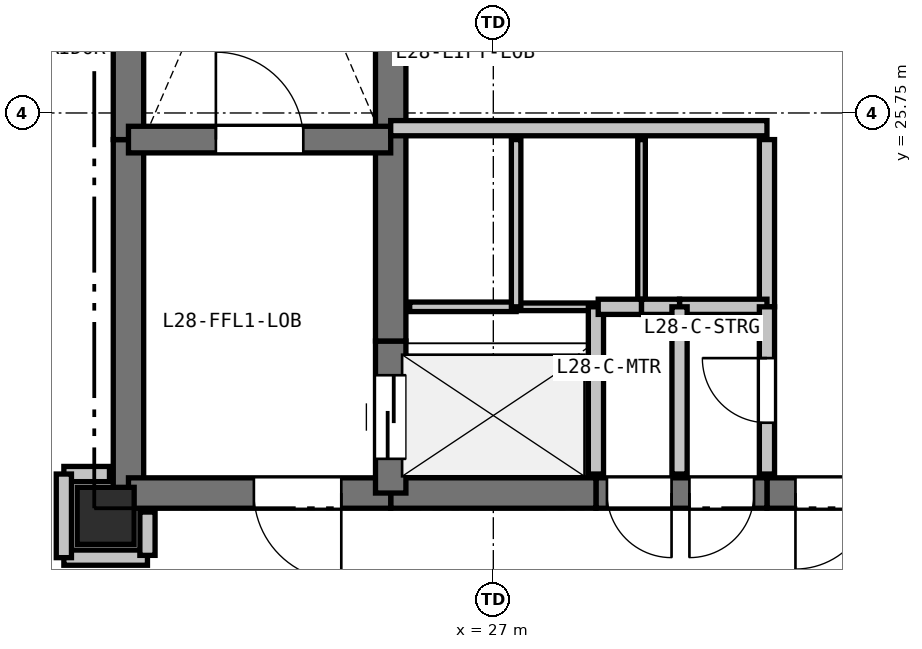
"""IFC4 building model, lengths in metres.
Left out: names, types, materials, properties, quantities, classifications, styles, units other than length and angle.
Written with IfcOpenShell. Run it as: python <this file> out.ifc"""

import sys

from ifc_helpers import new_model, si_unit, direction, frame, frame_2d, origin, origin_2d, place, context, subcontext, project, spatial, rectangle, extrude, element, fill, save


model = new_model("IFC4")
c1 = context("Model", 3, precision=1e-05, world=origin(), true_north=direction((0.0, 1.0)))
c2 = subcontext(c1, "Body", "Model", "MODEL_VIEW")
j1 = project(units=[si_unit("LENGTHUNIT", "METRE"), si_unit("PLANEANGLEUNIT", "RADIAN")], contexts=[c1])
p1 = place(None, origin())
s1 = spatial("IfcSite", under=j1, at=p1, CompositionType="ELEMENT")
p2 = place(p1, origin())
s2 = spatial("IfcBuilding", under=s1, at=p2, CompositionType="ELEMENT")
p3 = place(p2, frame((0.0, 0.0, 103.2)))
s3 = spatial("IfcBuildingStorey", under=s2, at=p3, CompositionType="ELEMENT", Elevation=103.2)
p4 = place(p3, frame((21.9, 20.45, 0.0), z_axis=(0.0, 0.0, 1.0), x_axis=(1.0, 0.0, 0.0)))
e1 = element("IfcColumn", 1, at=p4, inside=s3, PredefinedType="COLUMN", context=c2, shape_type="SweptSolid", body=[
    extrude(rectangle(XDim=0.75, YDim=0.75, at=origin_2d()), origin(), (0.0, 0.0, 1.0), 3.3),
])
p5 = place(p3, frame((22.2, 20.75, 0.0), z_axis=(0.0, 0.0, 1.0), x_axis=(0.0, 1.0, 0.0)))
e2 = element("IfcWall", 2, at=p5, inside=s3, PredefinedType="SHEAR", context=c2, shape_type="SweptSolid", body=[
    extrude(rectangle(XDim=4.65, YDim=0.4, at=frame_2d((2.325, 0.0))), origin(), (0.0, 0.0, 1.0), 3.05),
])
p6 = place(p3, frame((22.2, 25.4, 0.0), z_axis=(0.0, 0.0, 1.0), x_axis=(0.0, 1.0, 0.0)))
e3 = element("IfcWall", 3, at=p6, inside=s3, PredefinedType="SHEAR", context=c2, shape_type="SweptSolid", body=[
    extrude(rectangle(XDim=7.35, YDim=0.4, at=frame_2d((3.675, 0.0))), origin(), (0.0, 0.0, 1.0), 3.05),
])
p7 = place(p3, frame((32.35, 20.75, 0.0), z_axis=(0.0, 0.0, 1.0), x_axis=(-1.0, 0.0, 0.0)))
e4 = element("IfcWall", 4, at=p7, inside=s3, PredefinedType="SHEAR", context=c2, shape_type="SweptSolid", body=[
    extrude(rectangle(XDim=1.75, YDim=0.4, at=frame_2d((0.875, 0.0))), origin(), (0.0, 0.0, 1.0), 3.05),
])
p8 = place(p7, frame((0.375, 0.0, 0.0)))
e5 = element("IfcOpeningElement", 5, at=p8, cuts=e4, PredefinedType="OPENING", context=c2, shape_type="SweptSolid", body=[
    extrude(rectangle(XDim=1.0, YDim=2.15, at=frame_2d((0.5, 1.075))), frame((0.0, 0.21, 0.0), z_axis=(0.0, -1.0, 0.0), x_axis=(1.0, 0.0, 0.0)), (0.0, 0.0, 1.0), 0.42),
])
p9 = place(p3, frame((30.6, 20.75, 0.0), z_axis=(0.0, 0.0, 1.0), x_axis=(-1.0, 0.0, 0.0)))
e6 = element("IfcWall", 6, at=p9, inside=s3, PredefinedType="SHEAR", context=c2, shape_type="SweptSolid", body=[
    extrude(rectangle(XDim=2.25, YDim=0.4, at=frame_2d((1.125, 0.0))), origin(), (0.0, 0.0, 1.0), 3.05),
])
p10 = place(p9, frame((1.255, 0.0, 0.0)))
e7 = element("IfcOpeningElement", 7, at=p10, cuts=e6, PredefinedType="OPENING", context=c2, shape_type="SweptSolid", body=[
    extrude(rectangle(XDim=0.85, YDim=2.1, at=frame_2d((0.425, 1.05))), frame((0.0, 0.21, 0.0), z_axis=(0.0, -1.0, 0.0), x_axis=(1.0, 0.0, 0.0)), (0.0, 0.0, 1.0), 0.42),
])
p11 = place(p9, frame((0.17, 0.0, 0.0)))
e8 = element("IfcOpeningElement", 8, at=p11, cuts=e6, PredefinedType="OPENING", context=c2, shape_type="SweptSolid", body=[
    extrude(rectangle(XDim=0.85, YDim=2.1, at=frame_2d((0.425, 1.05))), frame((0.0, 0.21, 0.0), z_axis=(0.0, -1.0, 0.0), x_axis=(1.0, 0.0, 0.0)), (0.0, 0.0, 1.0), 0.42),
])
p12 = place(p3, frame((28.35, 20.75, 0.0), z_axis=(0.0, 0.0, 1.0), x_axis=(-1.0, 0.0, 0.0)))
e9 = element("IfcWall", 9, at=p12, inside=s3, PredefinedType="SHEAR", context=c2, shape_type="SweptSolid", body=[
    extrude(rectangle(XDim=2.7, YDim=0.4, at=frame_2d((1.35, 0.0))), origin(), (0.0, 0.0, 1.0), 3.05),
])
p13 = place(p3, frame((25.65, 20.75, 0.0), z_axis=(0.0, 0.0, 1.0), x_axis=(-1.0, 0.0, 0.0)))
e10 = element("IfcWall", 10, at=p13, inside=s3, PredefinedType="SHEAR", context=c2, shape_type="SweptSolid", body=[
    extrude(rectangle(XDim=3.45, YDim=0.4, at=frame_2d((1.725, 0.0))), origin(), (0.0, 0.0, 1.0), 3.05),
])
p14 = place(p13, frame((0.65, 0.0, 0.0)))
e11 = element("IfcOpeningElement", 11, at=p14, cuts=e10, PredefinedType="OPENING", context=c2, shape_type="SweptSolid", body=[
    extrude(rectangle(XDim=1.15, YDim=2.15, at=frame_2d((0.575, 1.075))), frame((0.0, 0.21, 0.0), z_axis=(0.0, -1.0, 0.0), x_axis=(1.0, 0.0, 0.0)), (0.0, 0.0, 1.0), 0.42),
])
p15 = place(p3, frame((25.65, 20.75, 0.0), z_axis=(0.0, 0.0, 1.0), x_axis=(0.0, 1.0, 0.0)))
e12 = element("IfcWall", 12, at=p15, inside=s3, PredefinedType="SHEAR", context=c2, shape_type="SweptSolid", body=[
    extrude(rectangle(XDim=2.0, YDim=0.4, at=frame_2d((1.0, 0.0))), origin(), (0.0, 0.0, 1.0), 3.05),
])
p16 = place(p15, frame((0.45, 0.0, 0.0)))
e13 = element("IfcOpeningElement", 13, at=p16, cuts=e12, PredefinedType="OPENING", context=c2, shape_type="SweptSolid", body=[
    extrude(rectangle(XDim=1.1, YDim=2.15, at=frame_2d((0.55, 1.075))), frame((0.0, 0.21, 0.0), z_axis=(0.0, -1.0, 0.0), x_axis=(1.0, 0.0, 0.0)), (0.0, 0.0, 1.0), 0.42),
])
p17 = place(p3, frame((25.65, 22.75, 0.0), z_axis=(0.0, 0.0, 1.0), x_axis=(0.0, 1.0, 0.0)))
e14 = element("IfcWall", 14, at=p17, inside=s3, PredefinedType="SHEAR", context=c2, shape_type="SweptSolid", body=[
    extrude(rectangle(XDim=2.8, YDim=0.4, at=frame_2d((1.4, 0.0))), origin(), (0.0, 0.0, 1.0), 3.05),
])
p18 = place(p3, frame((25.65, 25.55, 0.0), z_axis=(0.0, 0.0, 1.0), x_axis=(0.0, 1.0, 0.0)))
e15 = element("IfcWall", 15, at=p18, inside=s3, PredefinedType="SHEAR", context=c2, shape_type="SweptSolid", body=[
    extrude(rectangle(XDim=2.4, YDim=0.4, at=frame_2d((1.2, 0.0))), origin(), (0.0, 0.0, 1.0), 3.05),
])
p19 = place(p3, frame((22.2, 25.4, 0.0), z_axis=(0.0, 0.0, 1.0), x_axis=(1.0, 0.0, 0.0)))
e16 = element("IfcWall", 16, at=p19, inside=s3, PredefinedType="SHEAR", context=c2, shape_type="SweptSolid", body=[
    extrude(rectangle(XDim=3.45, YDim=0.35, at=frame_2d((1.725, 0.0))), origin(), (0.0, 0.0, 1.0), 3.05),
])
p20 = place(p19, frame((1.15, 0.0, 0.0)))
e17 = element("IfcOpeningElement", 17, at=p20, cuts=e16, PredefinedType="OPENING", context=c2, shape_type="SweptSolid", body=[
    extrude(rectangle(XDim=1.15, YDim=2.15, at=frame_2d((0.575, 1.075))), frame((0.0, 0.185, 0.0), z_axis=(0.0, -1.0, 0.0), x_axis=(1.0, 0.0, 0.0)), (0.0, 0.0, 1.0), 0.37),
])
p21 = place(p3, frame((25.65, 25.55, 0.0), z_axis=(0.0, 0.0, 1.0), x_axis=(1.0, 0.0, 0.0)))
e18 = element("IfcWall", 18, at=p21, inside=s3, PredefinedType="PARTITIONING", context=c2, shape_type="SweptSolid", body=[
    extrude(rectangle(XDim=4.95, YDim=0.2, at=frame_2d((2.475, 0.0))), origin(), (0.0, 0.0, 1.0), 3.05),
])
p22 = place(p3, frame((25.9, 23.2, 0.0), z_axis=(0.0, 0.0, 1.0), x_axis=(1.0, 0.0, 0.0)))
e19 = element("IfcWall", 19, at=p22, inside=s3, PredefinedType="PARTITIONING", context=c2, shape_type="SweptSolid", body=[
    extrude(rectangle(XDim=1.4, YDim=0.125, at=frame_2d((0.7, 0.0))), origin(), (0.0, 0.0, 1.0), 3.05),
])
p23 = place(p3, frame((27.3, 23.2, 0.0), z_axis=(0.0, 0.0, 1.0), x_axis=(1.0, 0.0, 0.0)))
e20 = element("IfcWall", 20, at=p23, inside=s3, PredefinedType="PARTITIONING", context=c2, shape_type="SweptSolid", body=[
    extrude(rectangle(XDim=1.05, YDim=0.1, at=frame_2d((0.525, 0.0))), origin(), (0.0, 0.0, 1.0), 3.05),
])
p24 = place(p3, frame((28.35, 23.2, 0.0), z_axis=(0.0, 0.0, 1.0), x_axis=(0.0, -1.0, 0.0)))
e21 = element("IfcWall", 21, at=p24, inside=s3, PredefinedType="PARTITIONING", context=c2, shape_type="SweptSolid", body=[
    extrude(rectangle(XDim=2.2, YDim=0.2, at=frame_2d((1.1, 0.0))), origin(), (0.0, 0.0, 1.0), 3.05),
])
p25 = place(p3, frame((27.3, 25.4, 0.0), z_axis=(0.0, 0.0, 1.0), x_axis=(0.0, -1.0, 0.0)))
e22 = element("IfcWall", 22, at=p25, inside=s3, PredefinedType="PARTITIONING", context=c2, shape_type="SweptSolid", body=[
    extrude(rectangle(XDim=2.2, YDim=0.125, at=frame_2d((1.1, 0.0))), origin(), (0.0, 0.0, 1.0), 3.05),
])
p26 = place(p3, frame((28.95, 25.4, 0.0), z_axis=(0.0, 0.0, 1.0), x_axis=(0.0, -1.0, 0.0)))
e23 = element("IfcWall", 23, at=p26, inside=s3, PredefinedType="PARTITIONING", context=c2, shape_type="SweptSolid", body=[
    extrude(rectangle(XDim=2.2, YDim=0.1, at=frame_2d((1.1, 0.0))), origin(), (0.0, 0.0, 1.0), 3.05),
])
p27 = place(p3, frame((28.95, 23.2, 0.0), z_axis=(0.0, 0.0, 1.0), x_axis=(-1.0, 0.0, 0.0)))
e24 = element("IfcWall", 24, at=p27, inside=s3, PredefinedType="PARTITIONING", context=c2, shape_type="SweptSolid", body=[
    extrude(rectangle(XDim=0.57, YDim=0.2, at=frame_2d((0.285, 0.0))), origin(), (0.0, 0.0, 1.0), 3.05),
])
p28 = place(p3, frame((30.6, 25.4, 0.0), z_axis=(0.0, 0.0, 1.0), x_axis=(0.0, -1.0, 0.0)))
e25 = element("IfcWall", 25, at=p28, inside=s3, PredefinedType="PARTITIONING", context=c2, shape_type="SweptSolid", body=[
    extrude(rectangle(XDim=2.2, YDim=0.2, at=frame_2d((1.1, 0.0))), origin(), (0.0, 0.0, 1.0), 3.05),
])
p29 = place(p3, frame((30.6, 23.2, 0.0), z_axis=(0.0, 0.0, 1.0), x_axis=(-1.0, 0.0, 0.0)))
e26 = element("IfcWall", 26, at=p29, inside=s3, PredefinedType="PARTITIONING", context=c2, shape_type="SweptSolid", body=[
    extrude(rectangle(XDim=1.15, YDim=0.2, at=frame_2d((0.575, 0.0))), origin(), (0.0, 0.0, 1.0), 3.05),
])
p30 = place(p3, frame((29.45, 23.2, 0.0), z_axis=(0.0, 0.0, 1.0), x_axis=(-1.0, 0.0, 0.0)))
e27 = element("IfcWall", 27, at=p30, inside=s3, PredefinedType="PARTITIONING", context=c2, shape_type="SweptSolid", body=[
    extrude(rectangle(XDim=0.5, YDim=0.2, at=frame_2d((0.25, 0.0))), origin(), (0.0, 0.0, 1.0), 3.05),
])
p31 = place(p3, frame((30.6, 21.0, 0.0), z_axis=(0.0, 0.0, 1.0), x_axis=(0.0, 1.0, 0.0)))
e28 = element("IfcWall", 28, at=p31, inside=s3, PredefinedType="PARTITIONING", context=c2, shape_type="SweptSolid", body=[
    extrude(rectangle(XDim=2.2, YDim=0.2, at=frame_2d((1.1, 0.0))), origin(), (0.0, 0.0, 1.0), 3.05),
])
p32 = place(p31, frame((0.675, 0.0, 0.0)))
e29 = element("IfcOpeningElement", 29, at=p32, cuts=e28, PredefinedType="OPENING", context=c2, shape_type="SweptSolid", body=[
    extrude(rectangle(XDim=0.85, YDim=2.1, at=frame_2d((0.425, 1.05))), frame((0.0, 0.11, 0.0), z_axis=(0.0, -1.0, 0.0), x_axis=(1.0, 0.0, 0.0)), (0.0, 0.0, 1.0), 0.22),
])
p33 = place(p3, frame((21.35, 19.9, 0.0), z_axis=(0.0, 0.0, 1.0), x_axis=(1.0, 0.0, 0.0)))
e30 = element("IfcWall", 30, at=p33, inside=s3, PredefinedType="PARTITIONING", context=c2, shape_type="SweptSolid", body=[
    extrude(rectangle(XDim=1.1, YDim=0.2, at=frame_2d((0.55, 0.0))), origin(), (0.0, 0.0, 1.0), 2.423),
])
p34 = place(p3, frame((22.45, 19.93, 0.0), z_axis=(0.0, 0.0, 1.0), x_axis=(0.0, 1.0, 0.0)))
e31 = element("IfcWall", 31, at=p34, inside=s3, PredefinedType="PARTITIONING", context=c2, shape_type="SweptSolid", body=[
    extrude(rectangle(XDim=0.57, YDim=0.2, at=frame_2d((0.285, 0.0))), origin(), (0.0, 0.0, 1.0), 2.423),
])
p35 = place(p3, frame((21.95, 21.0, 0.0), z_axis=(0.0, 0.0, 1.0), x_axis=(-1.0, 0.0, 0.0)))
e32 = element("IfcWall", 32, at=p35, inside=s3, PredefinedType="PARTITIONING", context=c2, shape_type="SweptSolid", body=[
    extrude(rectangle(XDim=0.6, YDim=0.2, at=frame_2d((0.3, 0.0))), origin(), (0.0, 0.0, 1.0), 2.498),
])
p36 = place(p3, frame((21.35, 21.0, 0.0), z_axis=(0.0, 0.0, 1.0), x_axis=(0.0, -1.0, 0.0)))
e33 = element("IfcWall", 33, at=p36, inside=s3, PredefinedType="PARTITIONING", context=c2, shape_type="SweptSolid", body=[
    extrude(rectangle(XDim=1.1, YDim=0.2, at=frame_2d((0.55, 0.0))), origin(), (0.0, 0.0, 1.0), 2.423),
])
p37 = place(p3, frame((29.45, 23.2, 0.0), z_axis=(0.0, 0.0, 1.0), x_axis=(0.0, -1.0, 0.0)))
e34 = element("IfcWall", 34, at=p37, inside=s3, PredefinedType="PARTITIONING", context=c2, shape_type="SweptSolid", body=[
    extrude(rectangle(XDim=2.2, YDim=0.2, at=frame_2d((1.1, 0.0))), origin(), (0.0, 0.0, 1.0), 3.05),
])
p38 = place(p8, origin())
e35 = element("IfcDoor", 35, at=p38, inside=s3, OperationType="SINGLE_SWING_RIGHT", PredefinedType="DOOR", context=c2, shape_type="SweptSolid", body=[
    extrude(rectangle(XDim=1.0, YDim=2.15, at=frame_2d((0.5, 1.075))), frame((0.0, 0.025, 0.0), z_axis=(0.0, -1.0, 0.0), x_axis=(1.0, 0.0, 0.0)), (0.0, 0.0, 1.0), 0.05),
])
fill(e5, e35)
p39 = place(p16, origin())
e36 = element("IfcDoor", 36, at=p39, inside=s3, OperationType="SLIDING_TO_LEFT", PredefinedType="DOOR", context=c2, shape_type="SweptSolid", body=[
    extrude(rectangle(XDim=1.1, YDim=2.15, at=frame_2d((0.55, 1.075))), frame((0.0, 0.025, 0.0), z_axis=(0.0, -1.0, 0.0), x_axis=(1.0, 0.0, 0.0)), (0.0, 0.0, 1.0), 0.05),
])
fill(e13, e36)
p40 = place(p20, origin())
e37 = element("IfcDoor", 37, at=p40, inside=s3, OperationType="SINGLE_SWING_LEFT", PredefinedType="DOOR", context=c2, shape_type="SweptSolid", body=[
    extrude(rectangle(XDim=1.15, YDim=2.15, at=frame_2d((0.575, 1.075))), frame((0.0, 0.025, 0.0), z_axis=(0.0, -1.0, 0.0), x_axis=(1.0, 0.0, 0.0)), (0.0, 0.0, 1.0), 0.05),
])
fill(e17, e37)
p41 = place(p14, origin())
e38 = element("IfcDoor", 38, at=p41, inside=s3, OperationType="SINGLE_SWING_LEFT", PredefinedType="DOOR", context=c2, shape_type="SweptSolid", body=[
    extrude(rectangle(XDim=1.15, YDim=2.15, at=frame_2d((0.575, 1.075))), frame((0.0, 0.025, 0.0), z_axis=(0.0, -1.0, 0.0), x_axis=(1.0, 0.0, 0.0)), (0.0, 0.0, 1.0), 0.05),
])
fill(e11, e38)
p42 = place(p32, origin())
e39 = element("IfcDoor", 39, at=p42, inside=s3, OperationType="SINGLE_SWING_RIGHT", PredefinedType="DOOR", context=c2, shape_type="SweptSolid", body=[
    extrude(rectangle(XDim=0.85, YDim=2.1, at=frame_2d((0.425, 1.05))), frame((0.0, 0.025, 0.0), z_axis=(0.0, -1.0, 0.0), x_axis=(1.0, 0.0, 0.0)), (0.0, 0.0, 1.0), 0.05),
])
fill(e29, e39)
p43 = place(p10, origin())
e40 = element("IfcDoor", 40, at=p43, inside=s3, OperationType="SINGLE_SWING_LEFT", PredefinedType="DOOR", context=c2, shape_type="SweptSolid", body=[
    extrude(rectangle(XDim=0.85, YDim=2.1, at=frame_2d((0.425, 1.05))), frame((0.0, 0.025, 0.0), z_axis=(0.0, -1.0, 0.0), x_axis=(1.0, 0.0, 0.0)), (0.0, 0.0, 1.0), 0.05),
])
fill(e7, e40)
p44 = place(p11, origin())
e41 = element("IfcDoor", 41, at=p44, inside=s3, OperationType="SINGLE_SWING_RIGHT", PredefinedType="DOOR", context=c2, shape_type="SweptSolid", body=[
    extrude(rectangle(XDim=0.85, YDim=2.1, at=frame_2d((0.425, 1.05))), frame((0.0, 0.025, 0.0), z_axis=(0.0, -1.0, 0.0), x_axis=(1.0, 0.0, 0.0)), (0.0, 0.0, 1.0), 0.05),
])
fill(e8, e41)
save(model, sys.argv[1])
